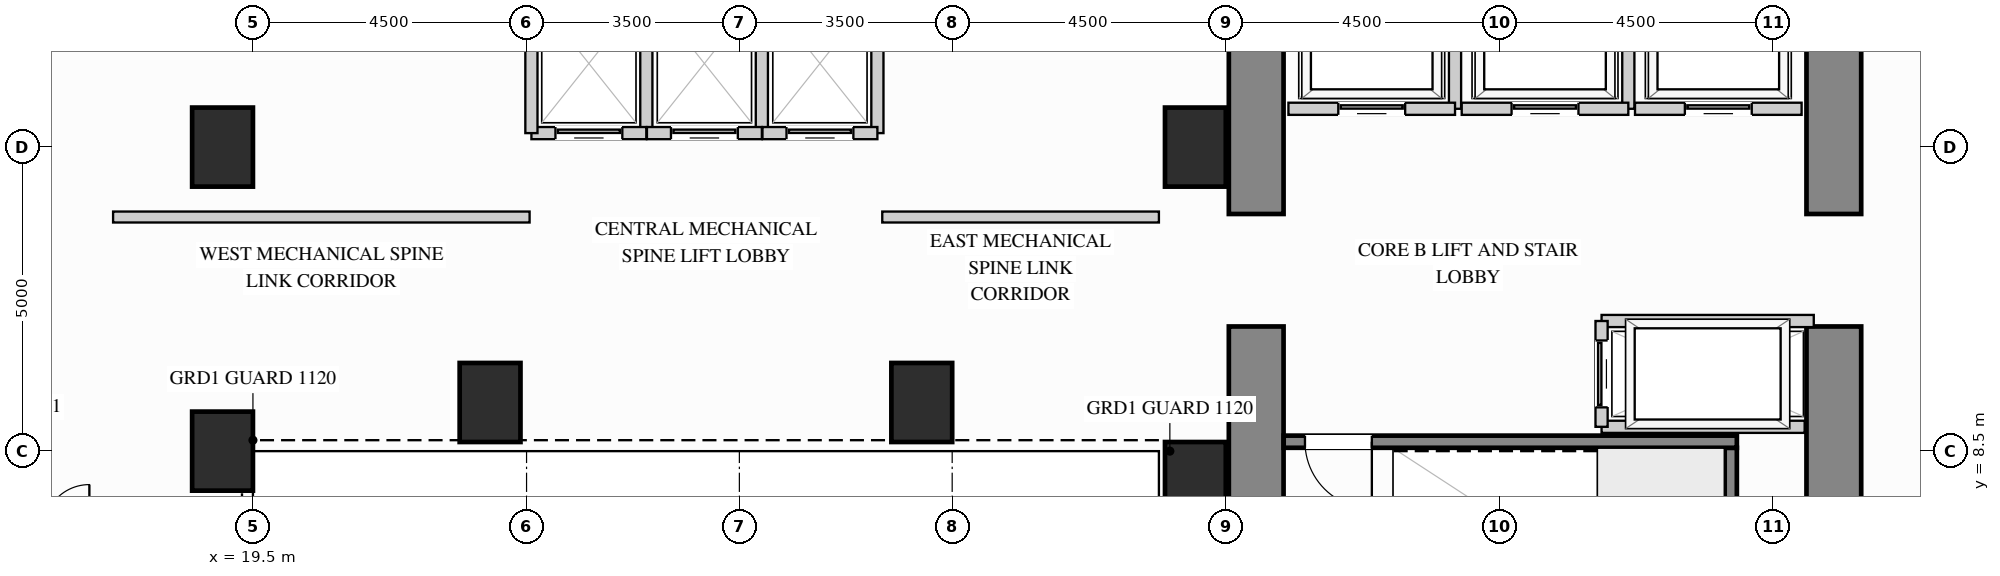
"""IFC4 building model, lengths in metres.
Left out: names, types, materials, properties, quantities, classifications, styles, units other than length and angle.
Written with IfcOpenShell. Run it as: python <this file> out.ifc"""

import sys

from ifc_helpers import new_model, si_unit, direction, frame, frame_2d, origin, origin_2d, place, context, subcontext, project, spatial, rectangle, extrude, source, transform, mapped, element, fill, save


model = new_model("IFC4")
c1 = context("Model", 3, precision=1e-05, world=origin(), true_north=direction((0.0, 1.0)))
c2 = subcontext(c1, "Body", "Model", "MODEL_VIEW")
j1 = project(units=[si_unit("LENGTHUNIT", "METRE"), si_unit("PLANEANGLEUNIT", "RADIAN")], contexts=[c1])
p1 = place(None, origin())
s1 = spatial("IfcSite", under=j1, at=p1, CompositionType="ELEMENT")
p2 = place(p1, origin())
s2 = spatial("IfcBuilding", under=s1, at=p2, CompositionType="ELEMENT")
p3 = place(p2, frame((0.0, 0.0, 72.9)))
s3 = spatial("IfcBuildingStorey", under=s2, at=p3, CompositionType="ELEMENT", Elevation=72.9)
m1 = source(origin(), c2, "Body", "SweptSolid", [
    extrude(rectangle(XDim=1.0, YDim=1.3, at=origin_2d()), origin(), (0.0, 0.0, 1.0), 4.26),
])
for number, where, z_axis, x_axis in (
    (1, (19.0, 13.5, 0.0), (0.0, 0.0, 1.0), (1.0, 0.0, 0.0)),
    (2, (19.0, 8.5, 0.0), (0.0, 0.0, 1.0), (1.0, 0.0, 0.0)),
    (3, (35.0, 13.5, 0.0), (0.0, 0.0, 1.0), (1.0, 0.0, 0.0)),
    (4, (35.0, 8.0, 0.0), (0.0, 0.0, 1.0), (1.0, 0.0, 0.0)),
    (5, (23.4, 9.3, 0.0), (0.0, 0.0, 1.0), (1.0, 0.0, 0.0)),
    (6, (30.5, 9.3, 0.0), (0.0, 0.0, 1.0), (1.0, 0.0, 0.0)),
):
    element("IfcColumn", number, at=place(p3, frame(where, z_axis=z_axis, x_axis=x_axis)), inside=s3, PredefinedType="COLUMN", context=c2, shape_type="MappedRepresentation", body=[
        mapped(m1, transform((0.0, 0.0, 0.0), x_axis=(1.0, 0.0, 0.0), y_axis=(0.0, 1.0, 0.0), z_axis=(0.0, 0.0, 1.0))),
    ])
m2 = source(origin(), c2, "Body", "SweptSolid", [
    extrude(rectangle(XDim=5.6, YDim=0.9, at=frame_2d((2.8, 0.0))), origin(), (0.0, 0.0, 1.0), 4.26),
])
p4 = place(p3, frame((45.5, 4.95, 0.0), z_axis=(0.0, 0.0, 1.0), x_axis=(0.0, 1.0, 0.0)))
e7 = element("IfcWall", 7, at=p4, inside=s3, PredefinedType="SHEAR", context=c2, shape_type="MappedRepresentation", body=[
    mapped(m2, transform((0.0, 0.0, 0.0), x_axis=(1.0, 0.0, 0.0), y_axis=(0.0, 1.0, 0.0), z_axis=(0.0, 0.0, 1.0))),
])
m3 = source(origin(), c2, "Body", "SweptSolid", [
    extrude(rectangle(XDim=3.65, YDim=0.9, at=frame_2d((1.825, 0.0))), origin(), (0.0, 0.0, 1.0), 4.26),
])
p5 = place(p3, frame((45.5, 12.4, 0.0), z_axis=(0.0, 0.0, 1.0), x_axis=(0.0, 1.0, 0.0)))
e8 = element("IfcWall", 8, at=p5, inside=s3, PredefinedType="SHEAR", context=c2, shape_type="MappedRepresentation", body=[
    mapped(m3, transform((0.0, 0.0, 0.0), x_axis=(1.0, 0.0, 0.0), y_axis=(0.0, 1.0, 0.0), z_axis=(0.0, 0.0, 1.0))),
])
p6 = place(p3, frame((36.0, 4.95, 0.0), z_axis=(0.0, 0.0, 1.0), x_axis=(0.0, 1.0, 0.0)))
e9 = element("IfcWall", 9, at=p6, inside=s3, PredefinedType="SHEAR", context=c2, shape_type="MappedRepresentation", body=[
    mapped(m2, transform((0.0, 0.0, 0.0), x_axis=(1.0, 0.0, 0.0), y_axis=(0.0, 1.0, 0.0), z_axis=(0.0, 0.0, 1.0))),
])
p7 = place(p3, frame((36.0, 12.4, 0.0), z_axis=(0.0, 0.0, 1.0), x_axis=(0.0, 1.0, 0.0)))
e10 = element("IfcWall", 10, at=p7, inside=s3, PredefinedType="SHEAR", context=c2, shape_type="MappedRepresentation", body=[
    mapped(m3, transform((0.0, 0.0, 0.0), x_axis=(1.0, 0.0, 0.0), y_axis=(0.0, 1.0, 0.0), z_axis=(0.0, 0.0, 1.0))),
])
m4 = source(origin(), c2, "Body", "SweptSolid", [
    extrude(rectangle(XDim=6.85, YDim=0.18, at=frame_2d((3.425, 0.0))), origin(), (0.0, 0.0, 1.0), 4.245),
])
p8 = place(p3, frame((17.2, 12.35, 0.0), z_axis=(0.0, 0.0, 1.0), x_axis=(1.0, 0.0, 0.0)))
e11 = element("IfcWall", 11, at=p8, inside=s3, PredefinedType="PARTITIONING", context=c2, shape_type="MappedRepresentation", body=[
    mapped(m4, transform((0.0, 0.0, 0.0), x_axis=(1.0, 0.0, 0.0), y_axis=(0.0, 1.0, 0.0), z_axis=(0.0, 0.0, 1.0))),
])
m5 = source(origin(), c2, "Body", "SweptSolid", [
    extrude(rectangle(XDim=4.55, YDim=0.18, at=frame_2d((2.275, 0.0))), origin(), (0.0, 0.0, 1.0), 4.245),
])
p9 = place(p3, frame((29.85, 12.35, 0.0), z_axis=(0.0, 0.0, 1.0), x_axis=(1.0, 0.0, 0.0)))
e12 = element("IfcWall", 12, at=p9, inside=s3, PredefinedType="PARTITIONING", context=c2, shape_type="MappedRepresentation", body=[
    mapped(m5, transform((0.0, 0.0, 0.0), x_axis=(1.0, 0.0, 0.0), y_axis=(0.0, 1.0, 0.0), z_axis=(0.0, 0.0, 1.0))),
])
m6 = source(origin(), c2, "Body", "SweptSolid", [
    extrude(rectangle(XDim=1.89, YDim=0.2, at=frame_2d((0.945, 0.0))), origin(), (0.0, 0.0, 1.0), 4.245),
])
p10 = place(p3, frame((39.27, 14.13, 0.0), z_axis=(0.0, 0.0, 1.0), x_axis=(0.0, 1.0, 0.0)))
e13 = element("IfcWall", 13, at=p10, inside=s3, PredefinedType="PARTITIONING", context=c2, shape_type="MappedRepresentation", body=[
    mapped(m6, transform((0.0, 0.0, 0.0), x_axis=(1.0, 0.0, 0.0), y_axis=(0.0, 1.0, 0.0), z_axis=(0.0, 0.0, 1.0))),
])
p11 = place(p3, frame((36.53, 14.13, 0.0), z_axis=(0.0, 0.0, 1.0), x_axis=(1.0, 0.0, 0.0)))
e14 = element("IfcWall", 14, at=p11, inside=s3, PredefinedType="PARTITIONING", context=c2, shape_type="SweptSolid", body=[
    extrude(rectangle(XDim=2.74, YDim=0.2, at=frame_2d((1.37, 0.0))), origin(), (0.0, 0.0, 1.0), 4.245),
])
p12 = place(p11, frame((0.82, 0.0, 0.0)))
e15 = element("IfcOpeningElement", 15, at=p12, cuts=e14, PredefinedType="OPENING", context=c2, shape_type="SweptSolid", body=[
    extrude(rectangle(XDim=1.1, YDim=2.2, at=frame_2d((0.55, 1.1))), frame((0.0, 0.11, 0.0), z_axis=(0.0, -1.0, 0.0), x_axis=(1.0, 0.0, 0.0)), (0.0, 0.0, 1.0), 0.22),
])
p13 = place(p3, frame((42.12, 14.13, 0.0), z_axis=(0.0, 0.0, 1.0), x_axis=(0.0, 1.0, 0.0)))
e16 = element("IfcWall", 16, at=p13, inside=s3, PredefinedType="PARTITIONING", context=c2, shape_type="MappedRepresentation", body=[
    mapped(m6, transform((0.0, 0.0, 0.0), x_axis=(1.0, 0.0, 0.0), y_axis=(0.0, 1.0, 0.0), z_axis=(0.0, 0.0, 1.0))),
])
p14 = place(p3, frame((39.38, 14.13, 0.0), z_axis=(0.0, 0.0, 1.0), x_axis=(1.0, 0.0, 0.0)))
e17 = element("IfcWall", 17, at=p14, inside=s3, PredefinedType="PARTITIONING", context=c2, shape_type="SweptSolid", body=[
    extrude(rectangle(XDim=2.74, YDim=0.2, at=frame_2d((1.37, 0.0))), origin(), (0.0, 0.0, 1.0), 4.245),
])
p15 = place(p14, frame((0.82, 0.0, 0.0)))
e18 = element("IfcOpeningElement", 18, at=p15, cuts=e17, PredefinedType="OPENING", context=c2, shape_type="SweptSolid", body=[
    extrude(rectangle(XDim=1.1, YDim=2.2, at=frame_2d((0.55, 1.1))), frame((0.0, 0.11, 0.0), z_axis=(0.0, -1.0, 0.0), x_axis=(1.0, 0.0, 0.0)), (0.0, 0.0, 1.0), 0.22),
])
p16 = place(p3, frame((42.23, 14.13, 0.0), z_axis=(0.0, 0.0, 1.0), x_axis=(1.0, 0.0, 0.0)))
e19 = element("IfcWall", 19, at=p16, inside=s3, PredefinedType="PARTITIONING", context=c2, shape_type="SweptSolid", body=[
    extrude(rectangle(XDim=2.74, YDim=0.2, at=frame_2d((1.37, 0.0))), origin(), (0.0, 0.0, 1.0), 4.245),
])
p17 = place(p16, frame((0.82, 0.0, 0.0)))
e20 = element("IfcOpeningElement", 20, at=p17, cuts=e19, PredefinedType="OPENING", context=c2, shape_type="SweptSolid", body=[
    extrude(rectangle(XDim=1.1, YDim=2.2, at=frame_2d((0.55, 1.1))), frame((0.0, 0.11, 0.0), z_axis=(0.0, -1.0, 0.0), x_axis=(1.0, 0.0, 0.0)), (0.0, 0.0, 1.0), 0.22),
])
m7 = source(origin(), c2, "Body", "SweptSolid", [
    extrude(rectangle(XDim=2.29, YDim=0.2, at=frame_2d((1.145, 0.0))), origin(), (0.0, 0.0, 1.0), 4.245),
])
p18 = place(p3, frame((25.97, 13.73, 0.0), z_axis=(0.0, 0.0, 1.0), x_axis=(0.0, 1.0, 0.0)))
e21 = element("IfcWall", 21, at=p18, inside=s3, PredefinedType="PARTITIONING", context=c2, shape_type="MappedRepresentation", body=[
    mapped(m7, transform((0.0, 0.0, 0.0), x_axis=(1.0, 0.0, 0.0), y_axis=(0.0, 1.0, 0.0), z_axis=(0.0, 0.0, 1.0))),
])
p19 = place(p3, frame((24.08, 13.73, 0.0), z_axis=(0.0, 0.0, 1.0), x_axis=(1.0, 0.0, 0.0)))
e22 = element("IfcWall", 22, at=p19, inside=s3, PredefinedType="PARTITIONING", context=c2, shape_type="SweptSolid", body=[
    extrude(rectangle(XDim=1.89, YDim=0.2, at=frame_2d((0.945, 0.0))), origin(), (0.0, 0.0, 1.0), 3.326),
])
p20 = place(p19, frame((0.395, 0.0, 0.0)))
e23 = element("IfcOpeningElement", 23, at=p20, cuts=e22, PredefinedType="OPENING", context=c2, shape_type="SweptSolid", body=[
    extrude(rectangle(XDim=1.1, YDim=2.2, at=frame_2d((0.55, 1.1))), frame((0.0, 0.11, 0.0), z_axis=(0.0, -1.0, 0.0), x_axis=(1.0, 0.0, 0.0)), (0.0, 0.0, 1.0), 0.22),
])
for number, where, z_axis, x_axis in (
    (24, (24.08, 13.73, 0.0), (0.0, 0.0, 1.0), (0.0, 1.0, 0.0)),
    (25, (27.87, 13.73, 0.0), (0.0, 0.0, 1.0), (0.0, 1.0, 0.0)),
):
    element("IfcWall", number, at=place(p3, frame(where, z_axis=z_axis, x_axis=x_axis)), inside=s3, PredefinedType="PARTITIONING", context=c2, shape_type="MappedRepresentation", body=[
        mapped(m7, transform((0.0, 0.0, 0.0), x_axis=(1.0, 0.0, 0.0), y_axis=(0.0, 1.0, 0.0), z_axis=(0.0, 0.0, 1.0))),
    ])
p21 = place(p3, frame((25.98, 13.73, 0.0), z_axis=(0.0, 0.0, 1.0), x_axis=(1.0, 0.0, 0.0)))
e26 = element("IfcWall", 26, at=p21, inside=s3, PredefinedType="PARTITIONING", context=c2, shape_type="SweptSolid", body=[
    extrude(rectangle(XDim=1.89, YDim=0.2, at=frame_2d((0.945, 0.0))), origin(), (0.0, 0.0, 1.0), 3.326),
])
p22 = place(p21, frame((0.395, 0.0, 0.0)))
e27 = element("IfcOpeningElement", 27, at=p22, cuts=e26, PredefinedType="OPENING", context=c2, shape_type="SweptSolid", body=[
    extrude(rectangle(XDim=1.1, YDim=2.2, at=frame_2d((0.55, 1.1))), frame((0.0, 0.11, 0.0), z_axis=(0.0, -1.0, 0.0), x_axis=(1.0, 0.0, 0.0)), (0.0, 0.0, 1.0), 0.22),
])
p23 = place(p3, frame((29.77, 13.73, 0.0), z_axis=(0.0, 0.0, 1.0), x_axis=(0.0, 1.0, 0.0)))
e28 = element("IfcWall", 28, at=p23, inside=s3, PredefinedType="PARTITIONING", context=c2, shape_type="MappedRepresentation", body=[
    mapped(m7, transform((0.0, 0.0, 0.0), x_axis=(1.0, 0.0, 0.0), y_axis=(0.0, 1.0, 0.0), z_axis=(0.0, 0.0, 1.0))),
])
p24 = place(p3, frame((27.88, 13.73, 0.0), z_axis=(0.0, 0.0, 1.0), x_axis=(1.0, 0.0, 0.0)))
e29 = element("IfcWall", 29, at=p24, inside=s3, PredefinedType="PARTITIONING", context=c2, shape_type="SweptSolid", body=[
    extrude(rectangle(XDim=1.89, YDim=0.2, at=frame_2d((0.945, 0.0))), origin(), (0.0, 0.0, 1.0), 3.326),
])
p25 = place(p24, frame((0.395, 0.0, 0.0)))
e30 = element("IfcOpeningElement", 30, at=p25, cuts=e29, PredefinedType="OPENING", context=c2, shape_type="SweptSolid", body=[
    extrude(rectangle(XDim=1.1, YDim=2.2, at=frame_2d((0.55, 1.1))), frame((0.0, 0.11, 0.0), z_axis=(0.0, -1.0, 0.0), x_axis=(1.0, 0.0, 0.0)), (0.0, 0.0, 1.0), 0.22),
])
m8 = source(origin(), c2, "Body", "SweptSolid", [
    extrude(rectangle(XDim=3.49, YDim=0.2, at=frame_2d((1.745, 0.0))), origin(), (0.0, 0.0, 1.0), 4.245),
])
p26 = place(p3, frame((41.68, 10.64, 0.0), z_axis=(0.0, 0.0, 1.0), x_axis=(1.0, 0.0, 0.0)))
e31 = element("IfcWall", 31, at=p26, inside=s3, PredefinedType="PARTITIONING", context=c2, shape_type="MappedRepresentation", body=[
    mapped(m8, transform((0.0, 0.0, 0.0), x_axis=(1.0, 0.0, 0.0), y_axis=(0.0, 1.0, 0.0), z_axis=(0.0, 0.0, 1.0))),
])
m9 = source(origin(), c2, "Body", "SweptSolid", [
    extrude(rectangle(XDim=3.34, YDim=0.2, at=frame_2d((1.67, 0.0))), origin(), (0.0, 0.0, 1.0), 4.245),
])
p27 = place(p3, frame((41.68, 8.9, 0.0), z_axis=(0.0, 0.0, 1.0), x_axis=(1.0, 0.0, 0.0)))
e32 = element("IfcWall", 32, at=p27, inside=s3, PredefinedType="PARTITIONING", context=c2, shape_type="MappedRepresentation", body=[
    mapped(m9, transform((0.0, 0.0, 0.0), x_axis=(1.0, 0.0, 0.0), y_axis=(0.0, 1.0, 0.0), z_axis=(0.0, 0.0, 1.0))),
])
p28 = place(p3, frame((41.68, 8.9, 0.0), z_axis=(0.0, 0.0, 1.0), x_axis=(0.0, 1.0, 0.0)))
e33 = element("IfcWall", 33, at=p28, inside=s3, PredefinedType="PARTITIONING", context=c2, shape_type="SweptSolid", body=[
    extrude(rectangle(XDim=1.74, YDim=0.2, at=frame_2d((0.87, 0.0))), origin(), (0.0, 0.0, 1.0), 4.245),
])
p29 = place(p28, frame((0.32, 0.0, 0.0)))
e34 = element("IfcOpeningElement", 34, at=p29, cuts=e33, PredefinedType="OPENING", context=c2, shape_type="SweptSolid", body=[
    extrude(rectangle(XDim=1.1, YDim=2.2, at=frame_2d((0.55, 1.1))), frame((0.0, 0.11, 0.0), z_axis=(0.0, -1.0, 0.0), x_axis=(1.0, 0.0, 0.0)), (0.0, 0.0, 1.0), 0.22),
])
m10 = source(origin(), c2, "Body", "SweptSolid", [
    extrude(rectangle(XDim=3.603, YDim=0.2, at=frame_2d((1.802, 0.0))), origin(), (0.0, 0.0, 1.0), 4.26),
])
p30 = place(p3, frame((43.805, 4.952, 0.0), z_axis=(0.0, 0.0, 1.0), x_axis=(0.0, 1.0, 0.0)))
e35 = element("IfcWall", 35, at=p30, inside=s3, PredefinedType="SHEAR", context=c2, shape_type="MappedRepresentation", body=[
    mapped(m10, transform((0.0, 0.0, 0.0), x_axis=(1.0, 0.0, 0.0), y_axis=(0.0, 1.0, 0.0), z_axis=(0.0, 0.0, 1.0))),
])
p31 = place(p3, frame((36.452, 8.655, 0.0), z_axis=(0.0, 0.0, 1.0), x_axis=(1.0, 0.0, 0.0)))
e36 = element("IfcWall", 36, at=p31, inside=s3, PredefinedType="SHEAR", context=c2, shape_type="SweptSolid", body=[
    extrude(rectangle(XDim=7.453, YDim=0.2, at=frame_2d((3.727, 0.0))), origin(), (0.0, 0.0, 1.0), 4.26),
])
p32 = place(p31, frame((0.35, 0.0, 0.0)))
e37 = element("IfcOpeningElement", 37, at=p32, cuts=e36, PredefinedType="OPENING", context=c2, shape_type="SweptSolid", body=[
    extrude(rectangle(XDim=1.1, YDim=2.15, at=frame_2d((0.55, 1.075))), frame((0.0, 0.11, 0.0), z_axis=(0.0, -1.0, 0.0), x_axis=(1.0, 0.0, 0.0)), (0.0, 0.0, 1.0), 0.22),
])
m11 = source(origin(), c2, "Body", "SweptSolid", [
    extrude(rectangle(XDim=1.1, YDim=2.2, at=frame_2d((0.55, 1.1))), frame((0.0, 0.025, 0.0), z_axis=(0.0, -1.0, 0.0), x_axis=(1.0, 0.0, 0.0)), (0.0, 0.0, 1.0), 0.05),
])
p33 = place(p12, origin())
e38 = element("IfcDoor", 38, at=p33, inside=s3, OperationType="SLIDING_TO_LEFT", PredefinedType="DOOR", context=c2, shape_type="MappedRepresentation", body=[
    mapped(m11, transform((0.0, 0.0, 0.0), x_axis=(1.0, 0.0, 0.0), y_axis=(0.0, 1.0, 0.0), z_axis=(0.0, 0.0, 1.0))),
])
fill(e15, e38)
p34 = place(p15, origin())
e39 = element("IfcDoor", 39, at=p34, inside=s3, OperationType="SLIDING_TO_LEFT", PredefinedType="DOOR", context=c2, shape_type="MappedRepresentation", body=[
    mapped(m11, transform((0.0, 0.0, 0.0), x_axis=(1.0, 0.0, 0.0), y_axis=(0.0, 1.0, 0.0), z_axis=(0.0, 0.0, 1.0))),
])
fill(e18, e39)
p35 = place(p17, origin())
e40 = element("IfcDoor", 40, at=p35, inside=s3, OperationType="SLIDING_TO_LEFT", PredefinedType="DOOR", context=c2, shape_type="MappedRepresentation", body=[
    mapped(m11, transform((0.0, 0.0, 0.0), x_axis=(1.0, 0.0, 0.0), y_axis=(0.0, 1.0, 0.0), z_axis=(0.0, 0.0, 1.0))),
])
fill(e20, e40)
p36 = place(p20, origin())
e41 = element("IfcDoor", 41, at=p36, inside=s3, OperationType="SLIDING_TO_LEFT", PredefinedType="DOOR", context=c2, shape_type="MappedRepresentation", body=[
    mapped(m11, transform((0.0, 0.0, 0.0), x_axis=(1.0, 0.0, 0.0), y_axis=(0.0, 1.0, 0.0), z_axis=(0.0, 0.0, 1.0))),
])
fill(e23, e41)
p37 = place(p22, origin())
e42 = element("IfcDoor", 42, at=p37, inside=s3, OperationType="SLIDING_TO_LEFT", PredefinedType="DOOR", context=c2, shape_type="MappedRepresentation", body=[
    mapped(m11, transform((0.0, 0.0, 0.0), x_axis=(1.0, 0.0, 0.0), y_axis=(0.0, 1.0, 0.0), z_axis=(0.0, 0.0, 1.0))),
])
fill(e27, e42)
p38 = place(p25, origin())
e43 = element("IfcDoor", 43, at=p38, inside=s3, OperationType="SLIDING_TO_LEFT", PredefinedType="DOOR", context=c2, shape_type="MappedRepresentation", body=[
    mapped(m11, transform((0.0, 0.0, 0.0), x_axis=(1.0, 0.0, 0.0), y_axis=(0.0, 1.0, 0.0), z_axis=(0.0, 0.0, 1.0))),
])
fill(e30, e43)
p39 = place(p29, origin())
e44 = element("IfcDoor", 44, at=p39, inside=s3, OperationType="SLIDING_TO_LEFT", PredefinedType="DOOR", context=c2, shape_type="MappedRepresentation", body=[
    mapped(m11, transform((0.0, 0.0, 0.0), x_axis=(1.0, 0.0, 0.0), y_axis=(0.0, 1.0, 0.0), z_axis=(0.0, 0.0, 1.0))),
])
fill(e34, e44)
m12 = source(origin(), c2, "Body", "SweptSolid", [
    extrude(rectangle(XDim=1.1, YDim=2.15, at=frame_2d((0.55, 1.075))), frame((0.0, 0.025, 0.0), z_axis=(0.0, -1.0, 0.0), x_axis=(1.0, 0.0, 0.0)), (0.0, 0.0, 1.0), 0.05),
])
p40 = place(p32, origin())
e45 = element("IfcDoor", 45, at=p40, inside=s3, OperationType="SINGLE_SWING_RIGHT", PredefinedType="DOOR", context=c2, shape_type="MappedRepresentation", body=[
    mapped(m12, transform((0.0, 0.0, 0.0), x_axis=(1.0, 0.0, 0.0), y_axis=(0.0, 1.0, 0.0), z_axis=(0.0, 0.0, 1.0))),
])
fill(e37, e45)
save(model, sys.argv[1])
